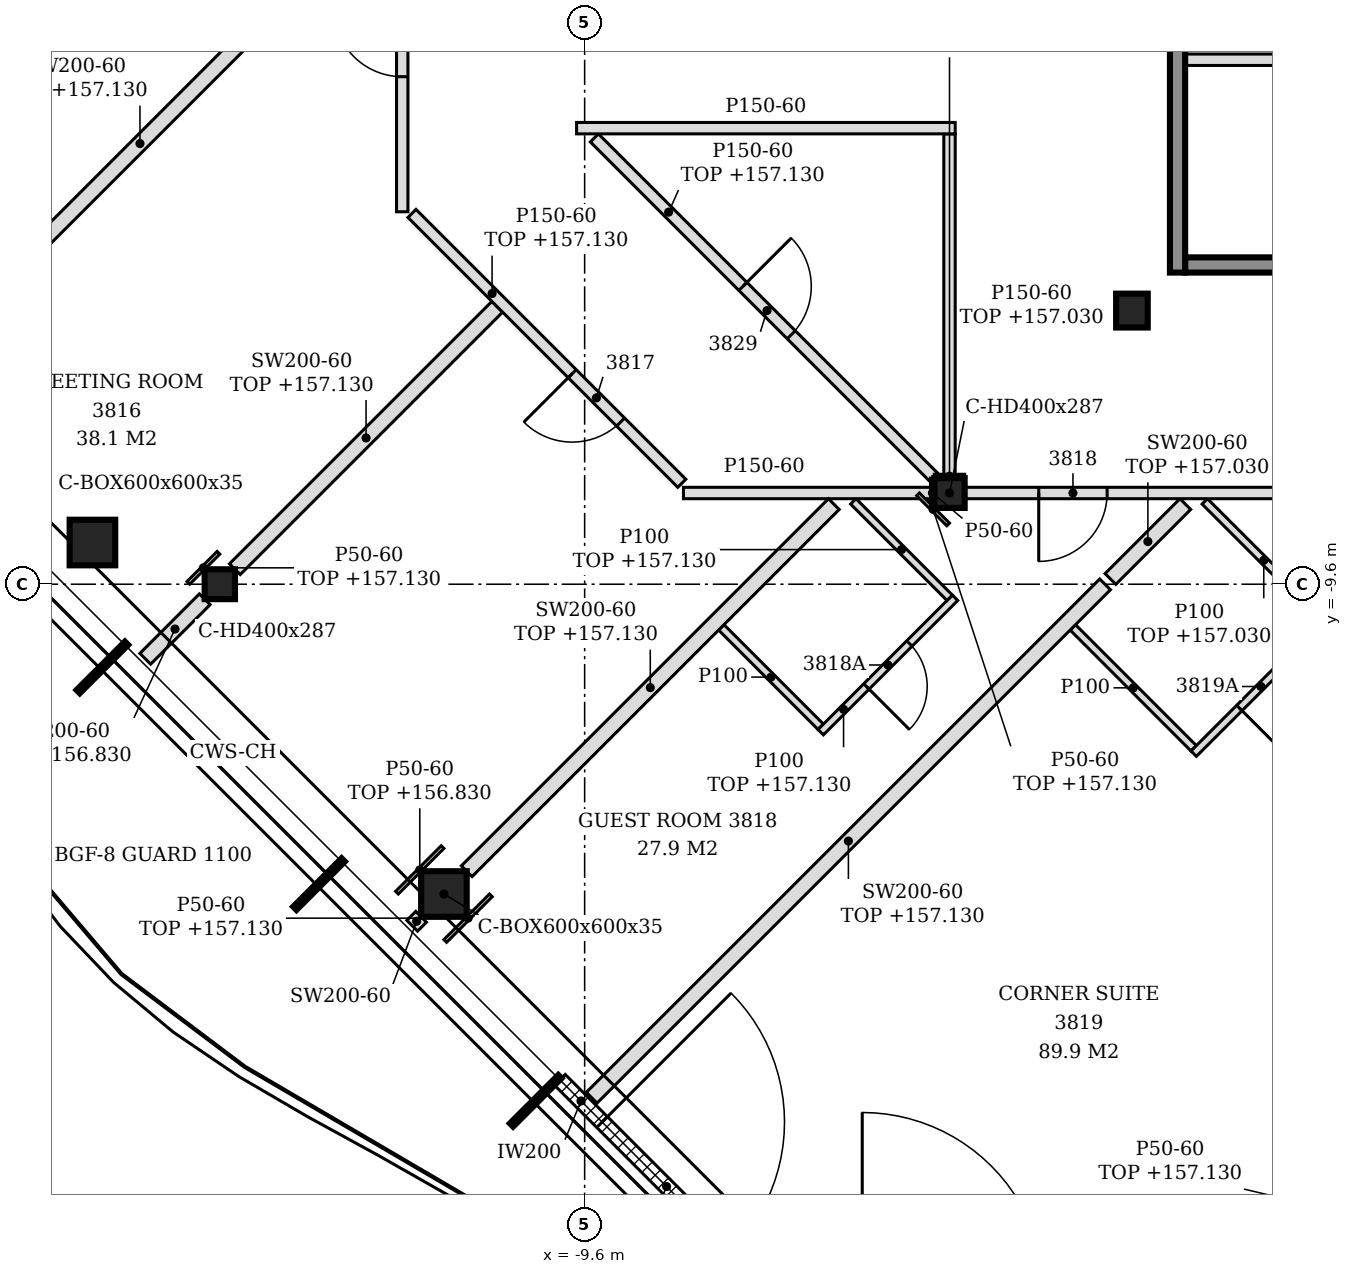
"""IFC4 building model, lengths in metres.
Left out: names, types, materials, properties, quantities, classifications, styles, units other than length and angle.
Written with IfcOpenShell. Run it as: python <this file> out.ifc"""

import sys

from ifc_helpers import new_model, si_unit, direction, frame, frame_2d, origin, origin_2d, place, context, subcontext, project, spatial, polyline, rectangle, hollow_rectangle, i_section, outline, extrude, element, fill, save


model = new_model("IFC4")
c1 = context("Model", 3, precision=1e-05, world=origin(), true_north=direction((0.0, 1.0)))
c2 = subcontext(c1, "Body", "Model", "MODEL_VIEW")
j1 = project(units=[si_unit("LENGTHUNIT", "METRE"), si_unit("PLANEANGLEUNIT", "RADIAN")], contexts=[c1])
p1 = place(None, origin())
s1 = spatial("IfcSite", under=j1, at=p1, CompositionType="ELEMENT")
p2 = place(p1, origin())
s2 = spatial("IfcBuilding", under=s1, at=p2, CompositionType="ELEMENT")
p3 = place(p2, frame((0.0, 0.0, 154.2)))
s3 = spatial("IfcBuildingStorey", under=s2, at=p3, CompositionType="ELEMENT", Elevation=154.2)
for number, where, z_axis, x_axis in (
    (1, (-16.076, -9.052, -0.15), (0.0, 0.0, 1.0), (1.0, 0.0, 0.0)),
    (2, (-11.451, -13.676, -0.15), (0.0, 0.0, 1.0), (1.0, 0.0, 0.0)),
):
    element("IfcColumn", number, at=place(p3, frame(where, z_axis=z_axis, x_axis=x_axis)), inside=s3, PredefinedType="COLUMN", context=c2, shape_type="SweptSolid", body=[
        extrude(hollow_rectangle(XDim=0.6, YDim=0.6, WallThickness=0.035, at=origin_2d()), origin(), (0.0, 0.0, 1.0), 3.6),
    ])
p4 = place(p3, frame((-4.8, -8.4, -0.15), z_axis=(0.0, 0.0, 1.0), x_axis=(1.0, 0.0, 0.0)))
e3 = element("IfcColumn", 3, at=p4, inside=s3, PredefinedType="COLUMN", context=c2, shape_type="SweptSolid", body=[
    extrude(i_section(OverallWidth=0.399, OverallDepth=0.393, WebThickness=0.023, FlangeThickness=0.037, FilletRadius=0.015, at=origin_2d()), origin(), (0.0, 0.0, 1.0), 3.6),
])
p5 = place(p3, frame((-2.4, -6.0, -0.15), z_axis=(0.0, 0.0, 1.0), x_axis=(1.0, 0.0, 0.0)))
e4 = element("IfcColumn", 4, at=p5, inside=s3, PredefinedType="COLUMN", context=c2, shape_type="SweptSolid", body=[
    extrude(i_section(OverallWidth=0.416, OverallDepth=0.446, WebThickness=0.039, FlangeThickness=0.063, FilletRadius=0.015, at=origin_2d()), origin(), (0.0, 0.0, 1.0), 3.6),
])
p6 = place(p3, frame((-14.4, -9.6, -0.15), z_axis=(0.0, 0.0, 1.0), x_axis=(1.0, 0.0, 0.0)))
e5 = element("IfcColumn", 5, at=p6, inside=s3, PredefinedType="COLUMN", context=c2, shape_type="SweptSolid", body=[
    extrude(i_section(OverallWidth=0.399, OverallDepth=0.393, WebThickness=0.023, FlangeThickness=0.037, FilletRadius=0.015, at=origin_2d()), origin(), (0.0, 0.0, 1.0), 3.6),
])
p7 = place(p3, frame((-9.926, -16.121, 0.0), z_axis=(0.0, 0.0, 1.0), x_axis=(0.707137595296, -0.707075965734, 0.0)))
e6 = element("IfcWall", 6, at=p7, inside=s3, PredefinedType="NOTDEFINED", context=c2, shape_type="SweptSolid", body=[
    extrude(rectangle(XDim=3.961, YDim=0.2, at=frame_2d((1.981, 0.0))), origin(), (0.0, 0.0, 1.0), 3.45),
])
p8 = place(p7, frame((0.785, 0.0, 0.0)))
e7 = element("IfcOpeningElement", 7, at=p8, cuts=e6, PredefinedType="OPENING", context=c2, shape_type="SweptSolid", body=[
    extrude(rectangle(XDim=2.4, YDim=2.4, at=frame_2d((1.2, 1.2))), frame((0.0, 0.11, 0.0), z_axis=(0.0, -1.0, 0.0), x_axis=(1.0, 0.0, 0.0)), (0.0, 0.0, 1.0), 0.22),
])
p9 = place(p3, frame((-1.7, -5.4, 0.0), z_axis=(0.0, 0.0, 1.0), x_axis=(1.0, 0.0, 0.0)))
e8 = element("IfcWall", 8, at=p9, inside=s3, PredefinedType="SOLIDWALL", context=c2, shape_type="SweptSolid", body=[
    extrude(rectangle(XDim=7.9, YDim=0.2, at=frame_2d((3.95, 0.0))), origin(), (0.0, 0.0, 1.0), 3.45),
])
p10 = place(p3, frame((-1.7, -2.7, 0.0), z_axis=(0.0, 0.0, 1.0), x_axis=(1.0, 0.0, 0.0)))
e9 = element("IfcWall", 9, at=p10, inside=s3, PredefinedType="PARTITIONING", context=c2, shape_type="SweptSolid", body=[
    extrude(rectangle(XDim=7.825, YDim=0.15, at=frame_2d((3.913, 0.0))), origin(), (0.0, 0.0, 1.0), 3.45),
])
p11 = place(p10, frame((3.45, 0.0, 0.0)))
e10 = element("IfcOpeningElement", 10, at=p11, cuts=e9, PredefinedType="OPENING", context=c2, shape_type="SweptSolid", body=[
    extrude(rectangle(XDim=0.9, YDim=2.1, at=frame_2d((0.45, 1.05))), frame((0.0, 0.085, 0.0), z_axis=(0.0, -1.0, 0.0), x_axis=(1.0, 0.0, 0.0)), (0.0, 0.0, 1.0), 0.17),
])
p12 = place(p3, frame((-1.8, -5.5, 0.0), z_axis=(0.0, 0.0, 1.0), x_axis=(0.0, 1.0, 0.0)))
e11 = element("IfcWall", 11, at=p12, inside=s3, PredefinedType="SOLIDWALL", context=c2, shape_type="SweptSolid", body=[
    extrude(rectangle(XDim=15.8, YDim=0.2, at=frame_2d((7.9, 0.0))), origin(), (0.0, 0.0, 1.0), 3.45),
])
p13 = place(p12, frame((3.05, 0.0, 0.0)))
e12 = element("IfcOpeningElement", 12, at=p13, cuts=e11, PredefinedType="OPENING", context=c2, shape_type="SweptSolid", body=[
    extrude(rectangle(XDim=1.3, YDim=2.1, at=frame_2d((0.65, 1.05))), frame((0.0, 0.11, 0.0), z_axis=(0.0, -1.0, 0.0), x_axis=(1.0, 0.0, 0.0)), (0.0, 0.0, 1.0), 0.22),
])
p14 = place(p12, frame((11.45, 0.0, 0.0)))
e13 = element("IfcOpeningElement", 13, at=p14, cuts=e11, PredefinedType="OPENING", context=c2, shape_type="SweptSolid", body=[
    extrude(rectangle(XDim=1.3, YDim=2.1, at=frame_2d((0.65, 1.05))), frame((0.0, 0.11, 0.0), z_axis=(0.0, -1.0, 0.0), x_axis=(1.0, 0.0, 0.0)), (0.0, 0.0, 1.0), 0.22),
])
p15 = place(p3, frame((-9.507, -16.355, 0.0), z_axis=(0.0, 0.0, 1.0), x_axis=(0.707170680804, 0.707042875794, 0.0)))
e14 = element("IfcWall", 14, at=p15, inside=s3, PredefinedType="PARTITIONING", context=c2, shape_type="SweptSolid", body=[
    extrude(rectangle(XDim=9.551, YDim=0.2, at=frame_2d((4.776, 0.0))), origin(), (0.0, 0.0, 1.0), 2.93),
])
p16 = place(p3, frame((-11.869, -14.093, 0.0), z_axis=(0.0, 0.0, 1.0), x_axis=(0.707106781187, 0.707106781187, 0.0)))
e15 = element("IfcWall", 15, at=p16, inside=s3, PredefinedType="PARTITIONING", context=c2, shape_type="SweptSolid", body=[
    extrude(rectangle(XDim=0.166, YDim=0.2, at=frame_2d((0.083, 0.0))), origin(), (0.0, 0.0, 1.0), 3.45),
])
p17 = place(p3, frame((-11.152, -13.375, 0.0), z_axis=(0.0, 0.0, 1.0), x_axis=(0.707106781187, 0.707106781187, 0.0)))
e16 = element("IfcWall", 16, at=p17, inside=s3, PredefinedType="PARTITIONING", context=c2, shape_type="SweptSolid", body=[
    extrude(rectangle(XDim=6.83, YDim=0.2, at=frame_2d((3.415, 0.0))), origin(), (0.0, 0.0, 1.0), 2.93),
])
p18 = place(p3, frame((-1.587, -11.759, 0.0), z_axis=(0.0, 0.0, 1.0), x_axis=(-0.706889644159, 0.707323851557, 0.0)))
e17 = element("IfcWall", 17, at=p18, inside=s3, PredefinedType="PARTITIONING", context=c2, shape_type="SweptSolid", body=[
    extrude(rectangle(XDim=2.249, YDim=0.1, at=frame_2d((1.125, 0.0))), origin(), (0.0, 0.0, 1.0), 3.45),
])
p19 = place(p3, frame((-1.587, -11.829, 0.0), z_axis=(0.0, 0.0, 1.0), x_axis=(0.707350821469, 0.706862656651, 0.0)))
e18 = element("IfcWall", 18, at=p19, inside=s3, PredefinedType="PARTITIONING", context=c2, shape_type="SweptSolid", body=[
    extrude(rectangle(XDim=2.5, YDim=0.1, at=frame_2d((1.25, 0.0))), origin(), (0.0, 0.0, 1.0), 3.45),
])
p20 = place(p19, frame((0.85, 0.0, 0.0)))
e19 = element("IfcOpeningElement", 19, at=p20, cuts=e18, PredefinedType="OPENING", context=c2, shape_type="SweptSolid", body=[
    extrude(rectangle(XDim=0.8, YDim=2.1, at=frame_2d((0.4, 1.05))), frame((0.0, 0.06, 0.0), z_axis=(0.0, -1.0, 0.0), x_axis=(1.0, 0.0, 0.0)), (0.0, 0.0, 1.0), 0.12),
])
p21 = place(p3, frame((-6.494, -11.476, 0.0), z_axis=(0.0, 0.0, 1.0), x_axis=(-0.707106781187, 0.707106781187, 0.0)))
e20 = element("IfcWall", 20, at=p21, inside=s3, PredefinedType="PARTITIONING", context=c2, shape_type="SweptSolid", body=[
    extrude(rectangle(XDim=1.85, YDim=0.1, at=frame_2d((0.925, 0.0))), origin(), (0.0, 0.0, 1.0), 3.45),
])
p22 = place(p3, frame((-6.494, -11.546, 0.0), z_axis=(0.0, 0.0, 1.0), x_axis=(0.707106781187, 0.707106781187, 0.0)))
e21 = element("IfcWall", 21, at=p22, inside=s3, PredefinedType="PARTITIONING", context=c2, shape_type="SweptSolid", body=[
    extrude(rectangle(XDim=2.5, YDim=0.1, at=frame_2d((1.25, 0.0))), origin(), (0.0, 0.0, 1.0), 2.93),
])
p23 = place(p22, frame((0.85, 0.0, 0.0)))
e22 = element("IfcOpeningElement", 22, at=p23, cuts=e21, PredefinedType="OPENING", context=c2, shape_type="SweptSolid", body=[
    extrude(rectangle(XDim=0.8, YDim=2.1, at=frame_2d((0.4, 1.05))), frame((0.0, 0.06, 0.0), z_axis=(0.0, -1.0, 0.0), x_axis=(1.0, 0.0, 0.0)), (0.0, 0.0, 1.0), 0.12),
])
p24 = place(p3, frame((-15.381, -10.581, 0.0), z_axis=(0.0, 0.0, 1.0), x_axis=(0.707217034054, 0.706996511125, 0.0)))
e23 = element("IfcWall", 23, at=p24, inside=s3, PredefinedType="PARTITIONING", context=c2, shape_type="SweptSolid", body=[
    extrude(rectangle(XDim=1.107, YDim=0.2, at=frame_2d((0.554, 0.0))), origin(), (0.0, 0.0, 1.0), 2.63),
])
p25 = place(p3, frame((0.111, -10.062, 0.0), z_axis=(0.0, 0.0, 1.0), x_axis=(-0.70732924673, 0.706884245631, 0.0)))
e24 = element("IfcWall", 24, at=p25, inside=s3, PredefinedType="PARTITIONING", context=c2, shape_type="SweptSolid", body=[
    extrude(rectangle(XDim=2.195, YDim=0.1, at=frame_2d((1.097, 0.0))), origin(), (0.0, 0.0, 1.0), 2.83),
])
p26 = place(p3, frame((-4.797, -9.779, 0.0), z_axis=(0.0, 0.0, 1.0), x_axis=(-0.707174840937, 0.707038714885, 0.0)))
e25 = element("IfcWall", 25, at=p26, inside=s3, PredefinedType="PARTITIONING", context=c2, shape_type="SweptSolid", body=[
    extrude(rectangle(XDim=1.793, YDim=0.1, at=frame_2d((0.897, 0.0))), origin(), (0.0, 0.0, 1.0), 2.93),
])
p27 = place(p3, frame((-2.683, -9.531, 0.0), z_axis=(0.0, 0.0, 1.0), x_axis=(0.707019164958, 0.70719438656, 0.0)))
e26 = element("IfcWall", 26, at=p27, inside=s3, PredefinedType="PARTITIONING", context=c2, shape_type="SweptSolid", body=[
    extrude(rectangle(XDim=1.393, YDim=0.2, at=frame_2d((0.697, 0.0))), origin(), (0.0, 0.0, 1.0), 2.83),
])
p28 = place(p3, frame((-14.202, -9.402, 0.0), z_axis=(0.0, 0.0, 1.0), x_axis=(0.707081776084, 0.707131785404, 0.0)))
e27 = element("IfcWall", 27, at=p28, inside=s3, PredefinedType="PARTITIONING", context=c2, shape_type="SweptSolid", body=[
    extrude(rectangle(XDim=4.882, YDim=0.2, at=frame_2d((2.441, 0.0))), origin(), (0.0, 0.0, 1.0), 2.93),
])
p29 = place(p3, frame((-8.3, -8.4, 0.0), z_axis=(0.0, 0.0, 1.0), x_axis=(1.0, 0.0, 0.0)))
e28 = element("IfcWall", 28, at=p29, inside=s3, PredefinedType="PARTITIONING", context=c2, shape_type="SweptSolid", body=[
    extrude(rectangle(XDim=3.301, YDim=0.15, at=frame_2d((1.65, 0.0))), origin(), (0.0, 0.0, 1.0), 3.45),
])
p30 = place(p3, frame((-4.601, -8.4, 0.0), z_axis=(0.0, 0.0, 1.0), x_axis=(1.0, 0.0, 0.0)))
e29 = element("IfcWall", 29, at=p30, inside=s3, PredefinedType="PARTITIONING", context=c2, shape_type="SweptSolid", body=[
    extrude(rectangle(XDim=11.601, YDim=0.15, at=frame_2d((5.801, 0.0))), origin(), (0.0, 0.0, 1.0), 2.83),
])
p31 = place(p30, frame((0.974, 0.0, 0.0)))
e30 = element("IfcOpeningElement", 30, at=p31, cuts=e29, PredefinedType="OPENING", context=c2, shape_type="SweptSolid", body=[
    extrude(rectangle(XDim=0.9, YDim=2.1, at=frame_2d((0.45, 1.05))), frame((0.0, 0.085, 0.0), z_axis=(0.0, -1.0, 0.0), x_axis=(1.0, 0.0, 0.0)), (0.0, 0.0, 1.0), 0.17),
])
p32 = place(p30, frame((4.636, 0.0, 0.0)))
e31 = element("IfcOpeningElement", 31, at=p32, cuts=e29, PredefinedType="OPENING", context=c2, shape_type="SweptSolid", body=[
    extrude(rectangle(XDim=0.9, YDim=2.1, at=frame_2d((0.45, 1.05))), frame((0.0, 0.085, 0.0), z_axis=(0.0, -1.0, 0.0), x_axis=(1.0, 0.0, 0.0)), (0.0, 0.0, 1.0), 0.17),
])
p33 = place(p30, frame((8.592, 0.0, 0.0)))
e32 = element("IfcOpeningElement", 32, at=p33, cuts=e29, PredefinedType="OPENING", context=c2, shape_type="SweptSolid", body=[
    extrude(rectangle(XDim=0.9, YDim=2.1, at=frame_2d((0.45, 1.05))), frame((0.0, 0.085, 0.0), z_axis=(0.0, -1.0, 0.0), x_axis=(1.0, 0.0, 0.0)), (0.0, 0.0, 1.0), 0.17),
])
p34 = place(p3, frame((-8.322, -8.272, 0.0), z_axis=(0.0, 0.0, 1.0), x_axis=(-0.707106781187, 0.707106781187, 0.0)))
e33 = element("IfcWall", 33, at=p34, inside=s3, PredefinedType="PARTITIONING", context=c2, shape_type="SweptSolid", body=[
    extrude(rectangle(XDim=5.021, YDim=0.15, at=frame_2d((2.51, 0.0))), origin(), (0.0, 0.0, 1.0), 2.93),
])
p35 = place(p34, frame((1.139, 0.0, 0.0)))
e34 = element("IfcOpeningElement", 34, at=p35, cuts=e33, PredefinedType="OPENING", context=c2, shape_type="SweptSolid", body=[
    extrude(rectangle(XDim=0.9, YDim=2.1, at=frame_2d((0.45, 1.05))), frame((0.0, 0.085, 0.0), z_axis=(0.0, -1.0, 0.0), x_axis=(1.0, 0.0, 0.0)), (0.0, 0.0, 1.0), 0.17),
])
p36 = place(p3, frame((-4.998, -8.202, 0.0), z_axis=(0.0, 0.0, 1.0), x_axis=(-0.707106781187, 0.707106781187, 0.0)))
e35 = element("IfcWall", 35, at=p36, inside=s3, PredefinedType="PARTITIONING", context=c2, shape_type="SweptSolid", body=[
    extrude(rectangle(XDim=6.327, YDim=0.15, at=frame_2d((3.164, 0.0))), origin(), (0.0, 0.0, 1.0), 2.93),
])
p37 = place(p36, frame((2.664, 0.0, 0.0)))
e36 = element("IfcOpeningElement", 36, at=p37, cuts=e35, PredefinedType="OPENING", context=c2, shape_type="SweptSolid", body=[
    extrude(rectangle(XDim=0.9, YDim=2.1, at=frame_2d((0.45, 1.05))), frame((0.0, 0.085, 0.0), z_axis=(0.0, -1.0, 0.0), x_axis=(1.0, 0.0, 0.0)), (0.0, 0.0, 1.0), 0.17),
])
p38 = place(p3, frame((-4.8, -8.204, 0.0), z_axis=(0.0, 0.0, 1.0), x_axis=(0.0, 1.0, 0.0)))
e37 = element("IfcWall", 37, at=p38, inside=s3, PredefinedType="PARTITIONING", context=c2, shape_type="SweptSolid", body=[
    extrude(rectangle(XDim=4.529, YDim=0.15, at=frame_2d((2.264, 0.0))), origin(), (0.0, 0.0, 1.0), 2.83),
])
p39 = place(p3, frame((-18.755, -7.107, 0.0), z_axis=(0.0, 0.0, 1.0), x_axis=(0.707106781187, 0.707106781187, 0.0)))
e38 = element("IfcWall", 38, at=p39, inside=s3, PredefinedType="PARTITIONING", context=c2, shape_type="SweptSolid", body=[
    extrude(rectangle(XDim=9.347, YDim=0.2, at=frame_2d((4.674, 0.0))), origin(), (0.0, 0.0, 1.0), 2.93),
])
p40 = place(p3, frame((-12.0, -4.7, 0.0), z_axis=(0.0, 0.0, 1.0), x_axis=(0.0, 1.0, 0.0)))
e39 = element("IfcWall", 39, at=p40, inside=s3, PredefinedType="PARTITIONING", context=c2, shape_type="SweptSolid", body=[
    extrude(outline(polyline([(0.0, 0.0), (13.913, 0.0), (13.913, 3.45), (9.6, 3.45), (9.598, 2.93), (9.4, 2.93), (9.398, 3.45), (4.8, 3.45), (4.798, 2.93), (4.6, 2.93), (4.598, 3.45), (0.0, 3.45), (0.0, 0.0)])), frame((0.0, 0.075, 0.0), z_axis=(0.0, -1.0, 0.0), x_axis=(1.0, 0.0, 0.0)), (0.0, 0.0, 1.0), 0.15),
])
p41 = place(p40, frame((12.347, 0.0, 0.0)))
e40 = element("IfcOpeningElement", 40, at=p41, cuts=e39, PredefinedType="OPENING", context=c2, shape_type="SweptSolid", body=[
    extrude(rectangle(XDim=0.9, YDim=2.1, at=frame_2d((0.45, 1.05))), frame((0.0, 0.085, 0.0), z_axis=(0.0, -1.0, 0.0), x_axis=(1.0, 0.0, 0.0)), (0.0, 0.0, 1.0), 0.17),
])
p42 = place(p40, frame((5.45, 0.0, 0.0)))
e41 = element("IfcOpeningElement", 41, at=p42, cuts=e39, PredefinedType="OPENING", context=c2, shape_type="SweptSolid", body=[
    extrude(rectangle(XDim=0.9, YDim=2.1, at=frame_2d((0.45, 1.05))), frame((0.0, 0.085, 0.0), z_axis=(0.0, -1.0, 0.0), x_axis=(1.0, 0.0, 0.0)), (0.0, 0.0, 1.0), 0.17),
])
p43 = place(p40, frame((1.777, 0.0, 0.0)))
e42 = element("IfcOpeningElement", 42, at=p43, cuts=e39, PredefinedType="OPENING", context=c2, shape_type="SweptSolid", body=[
    extrude(rectangle(XDim=0.9, YDim=2.1, at=frame_2d((0.45, 1.05))), frame((0.0, 0.085, 0.0), z_axis=(0.0, -1.0, 0.0), x_axis=(1.0, 0.0, 0.0)), (0.0, 0.0, 1.0), 0.17),
])
p44 = place(p3, frame((-9.706, -3.6, 0.0), z_axis=(0.0, 0.0, 1.0), x_axis=(1.0, 0.0, 0.0)))
e43 = element("IfcWall", 43, at=p44, inside=s3, PredefinedType="PARTITIONING", context=c2, shape_type="SweptSolid", body=[
    extrude(outline(polyline([(0.0, 0.0), (4.981, 0.0), (4.981, 2.83), (4.756, 2.83), (4.754, 3.45), (0.0, 3.45), (0.0, 0.0)])), frame((0.0, 0.075, 0.0), z_axis=(0.0, -1.0, 0.0), x_axis=(1.0, 0.0, 0.0)), (0.0, 0.0, 1.0), 0.15),
])
p45 = place(p3, frame((-12.069, -13.658, 0.0), z_axis=(0.0, 0.0, 1.0), x_axis=(0.707106781187, 0.707106781187, 0.0)))
e44 = element("IfcWall", 44, at=p45, inside=s3, PredefinedType="PARTITIONING", context=c2, shape_type="SweptSolid", body=[
    extrude(rectangle(XDim=0.848, YDim=0.05, at=frame_2d((0.424, 0.0))), origin(), (0.0, 0.0, 1.0), 2.63),
])
p46 = place(p3, frame((-11.434, -14.293, 0.0), z_axis=(0.0, 0.0, 1.0), x_axis=(0.707106781187, 0.707106781187, 0.0)))
e45 = element("IfcWall", 45, at=p46, inside=s3, PredefinedType="PARTITIONING", context=c2, shape_type="SweptSolid", body=[
    extrude(rectangle(XDim=0.849, YDim=0.05, at=frame_2d((0.424, 0.0))), origin(), (0.0, 0.0, 1.0), 2.93),
])
p47 = place(p3, frame((-14.814, -9.582, 0.0), z_axis=(0.0, 0.0, 1.0), x_axis=(0.707106781187, 0.707106781187, 0.0)))
e46 = element("IfcWall", 46, at=p47, inside=s3, PredefinedType="PARTITIONING", context=c2, shape_type="SweptSolid", body=[
    extrude(rectangle(XDim=0.56, YDim=0.05, at=frame_2d((0.28, 0.0))), origin(), (0.0, 0.0, 1.0), 2.93),
])
p48 = place(p3, frame((-5.0, -8.178, 0.0), z_axis=(0.0, 0.0, 1.0), x_axis=(1.0, 0.0, 0.0)))
e47 = element("IfcWall", 47, at=p48, inside=s3, PredefinedType="PARTITIONING", context=c2, shape_type="SweptSolid", body=[
    extrude(rectangle(XDim=0.399, YDim=0.05, at=frame_2d((0.199, 0.0))), origin(), (0.0, 0.0, 1.0), 2.83),
])
p49 = place(p3, frame((-4.818, -8.814, 0.0), z_axis=(0.0, 0.0, 1.0), x_axis=(-0.707106781187, 0.707106781187, 0.0)))
e48 = element("IfcWall", 48, at=p49, inside=s3, PredefinedType="PARTITIONING", context=c2, shape_type="SweptSolid", body=[
    extrude(rectangle(XDim=0.56, YDim=0.05, at=frame_2d((0.28, 0.0))), origin(), (0.0, 0.0, 1.0), 2.93),
])
p50 = place(p3, frame((-5.024, -8.596, 0.0), z_axis=(0.0, 0.0, 1.0), x_axis=(0.0, 1.0, 0.0)))
e49 = element("IfcWall", 49, at=p50, inside=s3, PredefinedType="PARTITIONING", context=c2, shape_type="SweptSolid", body=[
    extrude(rectangle(XDim=0.393, YDim=0.05, at=frame_2d((0.196, 0.0))), origin(), (0.0, 0.0, 1.0), 3.45),
])
p51 = place(p8, origin())
e50 = element("IfcDoor", 50, at=p51, inside=s3, OperationType="SINGLE_SWING_LEFT", PredefinedType="DOOR", context=c2, shape_type="SweptSolid", body=[
    extrude(rectangle(XDim=2.4, YDim=2.4, at=frame_2d((1.2, 1.2))), frame((0.0, 0.025, 0.0), z_axis=(0.0, -1.0, 0.0), x_axis=(1.0, 0.0, 0.0)), (0.0, 0.0, 1.0), 0.05),
])
fill(e7, e50)
p52 = place(p43, origin())
e51 = element("IfcDoor", 51, at=p52, inside=s3, OperationType="SINGLE_SWING_RIGHT", PredefinedType="DOOR", context=c2, shape_type="SweptSolid", body=[
    extrude(rectangle(XDim=0.9, YDim=2.1, at=frame_2d((0.45, 1.05))), frame((0.0, 0.025, 0.0), z_axis=(0.0, -1.0, 0.0), x_axis=(1.0, 0.0, 0.0)), (0.0, 0.0, 1.0), 0.05),
])
fill(e42, e51)
p53 = place(p35, origin())
e52 = element("IfcDoor", 52, at=p53, inside=s3, OperationType="SINGLE_SWING_RIGHT", PredefinedType="DOOR", context=c2, shape_type="SweptSolid", body=[
    extrude(rectangle(XDim=0.9, YDim=2.1, at=frame_2d((0.45, 1.05))), frame((0.0, 0.025, 0.0), z_axis=(0.0, -1.0, 0.0), x_axis=(1.0, 0.0, 0.0)), (0.0, 0.0, 1.0), 0.05),
])
fill(e34, e52)
p54 = place(p31, frame((0.9, 0.0, 0.0), z_axis=(0.0, 0.0, 1.0), x_axis=(-1.0, 0.0, 0.0)))
e53 = element("IfcDoor", 53, at=p54, inside=s3, OperationType="SINGLE_SWING_RIGHT", PredefinedType="DOOR", context=c2, shape_type="SweptSolid", body=[
    extrude(rectangle(XDim=0.9, YDim=2.1, at=frame_2d((0.45, 1.05))), frame((0.0, 0.025, 0.0), z_axis=(0.0, -1.0, 0.0), x_axis=(1.0, 0.0, 0.0)), (0.0, 0.0, 1.0), 0.05),
])
fill(e30, e53)
p55 = place(p23, frame((0.8, 0.0, 0.0), z_axis=(0.0, 0.0, 1.0), x_axis=(-1.0, 0.0, 0.0)))
e54 = element("IfcDoor", 54, at=p55, inside=s3, OperationType="SINGLE_SWING_RIGHT", PredefinedType="DOOR", context=c2, shape_type="SweptSolid", body=[
    extrude(rectangle(XDim=0.8, YDim=2.1, at=frame_2d((0.4, 1.05))), frame((0.0, 0.025, 0.0), z_axis=(0.0, -1.0, 0.0), x_axis=(1.0, 0.0, 0.0)), (0.0, 0.0, 1.0), 0.05),
])
fill(e22, e54)
p56 = place(p20, frame((0.8, 0.0, 0.0), z_axis=(0.0, 0.0, 1.0), x_axis=(-1.0, 0.0, 0.0)))
e55 = element("IfcDoor", 55, at=p56, inside=s3, OperationType="SINGLE_SWING_RIGHT", PredefinedType="DOOR", context=c2, shape_type="SweptSolid", body=[
    extrude(rectangle(XDim=0.8, YDim=2.1, at=frame_2d((0.4, 1.05))), frame((0.0, 0.025, 0.0), z_axis=(0.0, -1.0, 0.0), x_axis=(1.0, 0.0, 0.0)), (0.0, 0.0, 1.0), 0.05),
])
fill(e19, e55)
p57 = place(p37, frame((0.9, 0.0, 0.0), z_axis=(0.0, 0.0, 1.0), x_axis=(-1.0, 0.0, 0.0)))
e56 = element("IfcDoor", 56, at=p57, inside=s3, OperationType="SINGLE_SWING_LEFT", PredefinedType="DOOR", context=c2, shape_type="SweptSolid", body=[
    extrude(rectangle(XDim=0.9, YDim=2.1, at=frame_2d((0.45, 1.05))), frame((0.0, 0.025, 0.0), z_axis=(0.0, -1.0, 0.0), x_axis=(1.0, 0.0, 0.0)), (0.0, 0.0, 1.0), 0.05),
])
fill(e36, e56)
save(model, sys.argv[1])
